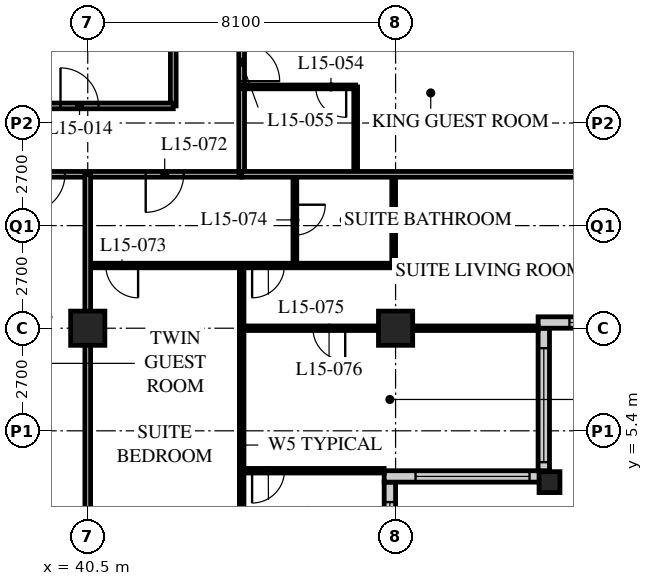
"""IFC4 building model, lengths in metres.
Left out: names, types, materials, properties, quantities, classifications, styles, units other than length and angle.
Written with IfcOpenShell. Run it as: python <this file> out.ifc"""

import sys

from ifc_helpers import new_model, si_unit, direction, frame, frame_2d, origin, origin_2d, place, context, subcontext, project, spatial, rectangle, hollow_rectangle, extrude, element, fill, save


model = new_model("IFC4")
c1 = context("Model", 3, precision=1e-05, world=origin(), true_north=direction((0.0, 1.0)))
c2 = subcontext(c1, "Body", "Model", "MODEL_VIEW")
j1 = project(units=[si_unit("LENGTHUNIT", "METRE"), si_unit("PLANEANGLEUNIT", "RADIAN")], contexts=[c1])
p1 = place(None, origin())
s1 = spatial("IfcSite", under=j1, at=p1, CompositionType="ELEMENT")
p2 = place(p1, origin())
s2 = spatial("IfcBuilding", under=s1, at=p2, CompositionType="ELEMENT")
p3 = place(p2, frame((0.0, 0.0, 63.6)))
s3 = spatial("IfcBuildingStorey", under=s2, at=p3, CompositionType="ELEMENT", Elevation=63.6)
for number, where, z_axis, x_axis in (
    (1, (40.5, 8.1, 0.0), (0.0, 0.0, 1.0), (1.0, 0.0, 0.0)),
    (2, (48.6, 8.1, 0.0), (0.0, 0.0, 1.0), (1.0, 0.0, 0.0)),
):
    element("IfcColumn", number, at=place(p3, frame(where, z_axis=z_axis, x_axis=x_axis)), inside=s3, PredefinedType="COLUMN", context=c2, shape_type="SweptSolid", body=[
        extrude(hollow_rectangle(XDim=0.9, YDim=0.9, WallThickness=0.09, at=origin_2d()), origin(), (0.0, 0.0, 1.0), 3.4),
    ])
p4 = place(p3, frame((52.65, 4.05, 0.0), z_axis=(0.0, 0.0, 1.0), x_axis=(1.0, 0.0, 0.0)))
e3 = element("IfcColumn", 3, at=p4, inside=s3, PredefinedType="COLUMN", context=c2, shape_type="SweptSolid", body=[
    extrude(hollow_rectangle(XDim=0.55, YDim=0.55, WallThickness=0.05, at=origin_2d()), origin(), (0.0, 0.0, 1.0), 3.4),
])
p5 = place(p3, frame((48.45, 0.3, 0.0), z_axis=(0.0, 0.0, 1.0), x_axis=(0.0, 1.0, 0.0)))
e4 = element("IfcWall", 4, at=p5, inside=s3, PredefinedType="SOLIDWALL", context=c2, shape_type="SweptSolid", body=[
    extrude(rectangle(XDim=3.75, YDim=0.3, at=frame_2d((1.875, 0.0))), origin(), (0.0, 0.0, 1.0), 3.19),
])
p6 = place(p5, frame((0.225, 0.0, 0.9)))
e5 = element("IfcOpeningElement", 5, at=p6, cuts=e4, PredefinedType="OPENING", context=c2, shape_type="SweptSolid", body=[
    extrude(rectangle(XDim=3.0, YDim=1.5, at=frame_2d((1.5, 0.75))), frame((0.0, 0.16, 0.0), z_axis=(0.0, -1.0, 0.0), x_axis=(1.0, 0.0, 0.0)), (0.0, 0.0, 1.0), 0.32),
])
p7 = place(p3, frame((48.3, 4.2, 0.0), z_axis=(0.0, 0.0, 1.0), x_axis=(1.0, 0.0, 0.0)))
e6 = element("IfcWall", 6, at=p7, inside=s3, PredefinedType="SOLIDWALL", context=c2, shape_type="SweptSolid", body=[
    extrude(rectangle(XDim=4.35, YDim=0.3, at=frame_2d((2.175, 0.0))), origin(), (0.0, 0.0, 1.0), 3.19),
])
p8 = place(p7, frame((0.825, 0.0, 0.9)))
e7 = element("IfcOpeningElement", 7, at=p8, cuts=e6, PredefinedType="OPENING", context=c2, shape_type="SweptSolid", body=[
    extrude(rectangle(XDim=3.0, YDim=1.5, at=frame_2d((1.5, 0.75))), frame((0.0, 0.16, 0.0), z_axis=(0.0, -1.0, 0.0), x_axis=(1.0, 0.0, 0.0)), (0.0, 0.0, 1.0), 0.32),
])
p9 = place(p3, frame((52.5, 4.35, 0.0), z_axis=(0.0, 0.0, 1.0), x_axis=(0.0, 1.0, 0.0)))
e8 = element("IfcWall", 8, at=p9, inside=s3, PredefinedType="SOLIDWALL", context=c2, shape_type="SweptSolid", body=[
    extrude(rectangle(XDim=3.75, YDim=0.3, at=frame_2d((1.875, 0.0))), origin(), (0.0, 0.0, 1.0), 3.19),
])
p10 = place(p9, frame((0.225, 0.0, 0.9)))
e9 = element("IfcOpeningElement", 9, at=p10, cuts=e8, PredefinedType="OPENING", context=c2, shape_type="SweptSolid", body=[
    extrude(rectangle(XDim=3.0, YDim=1.5, at=frame_2d((1.5, 0.75))), frame((0.0, 0.16, 0.0), z_axis=(0.0, -1.0, 0.0), x_axis=(1.0, 0.0, 0.0)), (0.0, 0.0, 1.0), 0.32),
])
p11 = place(p3, frame((52.35, 8.25, 0.0), z_axis=(0.0, 0.0, 1.0), x_axis=(1.0, 0.0, 0.0)))
e10 = element("IfcWall", 10, at=p11, inside=s3, PredefinedType="SOLIDWALL", context=c2, shape_type="SweptSolid", body=[
    extrude(rectangle(XDim=4.35, YDim=0.3, at=frame_2d((2.175, 0.0))), origin(), (0.0, 0.0, 1.0), 3.19),
])
p12 = place(p11, frame((0.825, 0.0, 0.9)))
e11 = element("IfcOpeningElement", 11, at=p12, cuts=e10, PredefinedType="OPENING", context=c2, shape_type="SweptSolid", body=[
    extrude(rectangle(XDim=3.0, YDim=1.5, at=frame_2d((1.5, 0.75))), frame((0.0, 0.16, 0.0), z_axis=(0.0, -1.0, 0.0), x_axis=(1.0, 0.0, 0.0)), (0.0, 0.0, 1.0), 0.32),
])
p13 = place(p3, frame((8.1, 12.15, 0.0), z_axis=(0.0, 0.0, 1.0), x_axis=(1.0, 0.0, 0.0)))
e12 = element("IfcWall", 12, at=p13, inside=s3, PredefinedType="PARTITIONING", context=c2, shape_type="SweptSolid", body=[
    extrude(rectangle(XDim=36.45, YDim=0.15, at=frame_2d((18.225, 0.0))), origin(), (0.0, 0.0, 1.0), 3.19),
])
p14 = place(p13, frame((4.35, 0.0, 0.0)))
e13 = element("IfcOpeningElement", 13, at=p14, cuts=e12, PredefinedType="OPENING", context=c2, shape_type="SweptSolid", body=[
    extrude(rectangle(XDim=1.0, YDim=2.1, at=frame_2d((0.5, 1.05))), frame((0.0, 0.085, 0.0), z_axis=(0.0, -1.0, 0.0), x_axis=(1.0, 0.0, 0.0)), (0.0, 0.0, 1.0), 0.17),
])
p15 = place(p13, frame((10.55, 0.0, 0.0)))
e14 = element("IfcOpeningElement", 14, at=p15, cuts=e12, PredefinedType="OPENING", context=c2, shape_type="SweptSolid", body=[
    extrude(rectangle(XDim=1.0, YDim=2.1, at=frame_2d((0.5, 1.05))), frame((0.0, 0.085, 0.0), z_axis=(0.0, -1.0, 0.0), x_axis=(1.0, 0.0, 0.0)), (0.0, 0.0, 1.0), 0.17),
])
p16 = place(p13, frame((14.6, 0.0, 0.0)))
e15 = element("IfcOpeningElement", 15, at=p16, cuts=e12, PredefinedType="OPENING", context=c2, shape_type="SweptSolid", body=[
    extrude(rectangle(XDim=1.0, YDim=2.1, at=frame_2d((0.5, 1.05))), frame((0.0, 0.085, 0.0), z_axis=(0.0, -1.0, 0.0), x_axis=(1.0, 0.0, 0.0)), (0.0, 0.0, 1.0), 0.17),
])
p17 = place(p13, frame((18.65, 0.0, 0.0)))
e16 = element("IfcOpeningElement", 16, at=p17, cuts=e12, PredefinedType="OPENING", context=c2, shape_type="SweptSolid", body=[
    extrude(rectangle(XDim=1.0, YDim=2.1, at=frame_2d((0.5, 1.05))), frame((0.0, 0.085, 0.0), z_axis=(0.0, -1.0, 0.0), x_axis=(1.0, 0.0, 0.0)), (0.0, 0.0, 1.0), 0.17),
])
p18 = place(p13, frame((22.7, 0.0, 0.0)))
e17 = element("IfcOpeningElement", 17, at=p18, cuts=e12, PredefinedType="OPENING", context=c2, shape_type="SweptSolid", body=[
    extrude(rectangle(XDim=1.0, YDim=2.1, at=frame_2d((0.5, 1.05))), frame((0.0, 0.085, 0.0), z_axis=(0.0, -1.0, 0.0), x_axis=(1.0, 0.0, 0.0)), (0.0, 0.0, 1.0), 0.17),
])
p19 = place(p13, frame((24.6, 0.0, 0.0)))
e18 = element("IfcOpeningElement", 18, at=p19, cuts=e12, PredefinedType="OPENING", context=c2, shape_type="SweptSolid", body=[
    extrude(rectangle(XDim=1.0, YDim=2.1, at=frame_2d((0.5, 1.05))), frame((0.0, 0.085, 0.0), z_axis=(0.0, -1.0, 0.0), x_axis=(1.0, 0.0, 0.0)), (0.0, 0.0, 1.0), 0.17),
])
p20 = place(p13, frame((30.8, 0.0, 0.0)))
e19 = element("IfcOpeningElement", 19, at=p20, cuts=e12, PredefinedType="OPENING", context=c2, shape_type="SweptSolid", body=[
    extrude(rectangle(XDim=1.0, YDim=2.1, at=frame_2d((0.5, 1.05))), frame((0.0, 0.085, 0.0), z_axis=(0.0, -1.0, 0.0), x_axis=(1.0, 0.0, 0.0)), (0.0, 0.0, 1.0), 0.17),
])
p21 = place(p13, frame((1.525, 0.0, 0.0)))
e20 = element("IfcOpeningElement", 20, at=p21, cuts=e12, PredefinedType="OPENING", context=c2, shape_type="SweptSolid", body=[
    extrude(rectangle(XDim=1.0, YDim=2.1, at=frame_2d((0.5, 1.05))), frame((0.0, 0.085, 0.0), z_axis=(0.0, -1.0, 0.0), x_axis=(1.0, 0.0, 0.0)), (0.0, 0.0, 1.0), 0.17),
])
p22 = place(p13, frame((33.925, 0.0, 0.0)))
e21 = element("IfcOpeningElement", 21, at=p22, cuts=e12, PredefinedType="OPENING", context=c2, shape_type="SweptSolid", body=[
    extrude(rectangle(XDim=1.0, YDim=2.1, at=frame_2d((0.5, 1.05))), frame((0.0, 0.085, 0.0), z_axis=(0.0, -1.0, 0.0), x_axis=(1.0, 0.0, 0.0)), (0.0, 0.0, 1.0), 0.17),
])
p23 = place(p3, frame((44.55, 12.15, 0.0), z_axis=(0.0, 0.0, 1.0), x_axis=(0.0, 1.0, 0.0)))
e22 = element("IfcWall", 22, at=p23, inside=s3, PredefinedType="PARTITIONING", context=c2, shape_type="SweptSolid", body=[
    extrude(rectangle(XDim=30.15, YDim=0.15, at=frame_2d((15.075, 0.0))), origin(), (0.0, 0.0, 1.0), 3.19),
])
p24 = place(p23, frame((2.45, 0.0, 0.0)))
e23 = element("IfcOpeningElement", 23, at=p24, cuts=e22, PredefinedType="OPENING", context=c2, shape_type="SweptSolid", body=[
    extrude(rectangle(XDim=1.0, YDim=2.1, at=frame_2d((0.5, 1.05))), frame((0.0, 0.085, 0.0), z_axis=(0.0, -1.0, 0.0), x_axis=(1.0, 0.0, 0.0)), (0.0, 0.0, 1.0), 0.17),
])
p25 = place(p23, frame((4.35, 0.0, 0.0)))
e24 = element("IfcOpeningElement", 24, at=p25, cuts=e22, PredefinedType="OPENING", context=c2, shape_type="SweptSolid", body=[
    extrude(rectangle(XDim=1.0, YDim=2.1, at=frame_2d((0.5, 1.05))), frame((0.0, 0.085, 0.0), z_axis=(0.0, -1.0, 0.0), x_axis=(1.0, 0.0, 0.0)), (0.0, 0.0, 1.0), 0.17),
])
p26 = place(p23, frame((8.4, 0.0, 0.0)))
e25 = element("IfcOpeningElement", 25, at=p26, cuts=e22, PredefinedType="OPENING", context=c2, shape_type="SweptSolid", body=[
    extrude(rectangle(XDim=1.0, YDim=2.1, at=frame_2d((0.5, 1.05))), frame((0.0, 0.085, 0.0), z_axis=(0.0, -1.0, 0.0), x_axis=(1.0, 0.0, 0.0)), (0.0, 0.0, 1.0), 0.17),
])
p27 = place(p23, frame((14.6, 0.0, 0.0)))
e26 = element("IfcOpeningElement", 26, at=p27, cuts=e22, PredefinedType="OPENING", context=c2, shape_type="SweptSolid", body=[
    extrude(rectangle(XDim=1.0, YDim=2.1, at=frame_2d((0.5, 1.05))), frame((0.0, 0.085, 0.0), z_axis=(0.0, -1.0, 0.0), x_axis=(1.0, 0.0, 0.0)), (0.0, 0.0, 1.0), 0.17),
])
p28 = place(p23, frame((21.65, 0.0, 0.0)))
e27 = element("IfcOpeningElement", 27, at=p28, cuts=e22, PredefinedType="OPENING", context=c2, shape_type="SweptSolid", body=[
    extrude(rectangle(XDim=1.0, YDim=2.1, at=frame_2d((0.5, 1.05))), frame((0.0, 0.085, 0.0), z_axis=(0.0, -1.0, 0.0), x_axis=(1.0, 0.0, 0.0)), (0.0, 0.0, 1.0), 0.17),
])
p29 = place(p23, frame((26.7, 0.0, 0.0)))
e28 = element("IfcOpeningElement", 28, at=p29, cuts=e22, PredefinedType="OPENING", context=c2, shape_type="SweptSolid", body=[
    extrude(rectangle(XDim=1.0, YDim=2.1, at=frame_2d((0.5, 1.05))), frame((0.0, 0.085, 0.0), z_axis=(0.0, -1.0, 0.0), x_axis=(1.0, 0.0, 0.0)), (0.0, 0.0, 1.0), 0.17),
])
p30 = place(p3, frame((42.75, 13.95, 0.0), z_axis=(0.0, 0.0, 1.0), x_axis=(0.0, 1.0, 0.0)))
e29 = element("IfcWall", 29, at=p30, inside=s3, PredefinedType="PARTITIONING", context=c2, shape_type="SweptSolid", body=[
    extrude(rectangle(XDim=26.55, YDim=0.15, at=frame_2d((13.275, 0.0))), origin(), (0.0, 0.0, 1.0), 3.19),
])
p31 = place(p30, frame((13.9, 0.0, 0.0)))
e30 = element("IfcOpeningElement", 30, at=p31, cuts=e29, PredefinedType="OPENING", context=c2, shape_type="SweptSolid", body=[
    extrude(rectangle(XDim=1.0, YDim=2.1, at=frame_2d((0.5, 1.05))), frame((0.0, 0.085, 0.0), z_axis=(0.0, -1.0, 0.0), x_axis=(1.0, 0.0, 0.0)), (0.0, 0.0, 1.0), 0.17),
])
p32 = place(p30, frame((22.0, 0.0, 0.0)))
e31 = element("IfcOpeningElement", 31, at=p32, cuts=e29, PredefinedType="OPENING", context=c2, shape_type="SweptSolid", body=[
    extrude(rectangle(XDim=1.0, YDim=2.1, at=frame_2d((0.5, 1.05))), frame((0.0, 0.085, 0.0), z_axis=(0.0, -1.0, 0.0), x_axis=(1.0, 0.0, 0.0)), (0.0, 0.0, 1.0), 0.17),
])
p33 = place(p3, frame((29.56, 13.95, 0.0), z_axis=(0.0, 0.0, 1.0), x_axis=(1.0, 0.0, 0.0)))
e32 = element("IfcWall", 32, at=p33, inside=s3, PredefinedType="PARTITIONING", context=c2, shape_type="SweptSolid", body=[
    extrude(rectangle(XDim=13.19, YDim=0.15, at=frame_2d((6.595, 0.0))), origin(), (0.0, 0.0, 1.0), 3.19),
])
p34 = place(p33, frame((1.157, 0.0, 0.0)))
e33 = element("IfcOpeningElement", 33, at=p34, cuts=e32, PredefinedType="OPENING", context=c2, shape_type="SweptSolid", body=[
    extrude(rectangle(XDim=1.0, YDim=2.1, at=frame_2d((0.5, 1.05))), frame((0.0, 0.085, 0.0), z_axis=(0.0, -1.0, 0.0), x_axis=(1.0, 0.0, 0.0)), (0.0, 0.0, 1.0), 0.17),
])
p35 = place(p33, frame((5.29, 0.0, 0.0)))
e34 = element("IfcOpeningElement", 34, at=p35, cuts=e32, PredefinedType="OPENING", context=c2, shape_type="SweptSolid", body=[
    extrude(rectangle(XDim=1.0, YDim=2.1, at=frame_2d((0.5, 1.05))), frame((0.0, 0.085, 0.0), z_axis=(0.0, -1.0, 0.0), x_axis=(1.0, 0.0, 0.0)), (0.0, 0.0, 1.0), 0.17),
])
p36 = place(p33, frame((10.223, 0.0, 0.0)))
e35 = element("IfcOpeningElement", 35, at=p36, cuts=e32, PredefinedType="OPENING", context=c2, shape_type="SweptSolid", body=[
    extrude(rectangle(XDim=1.0, YDim=2.1, at=frame_2d((0.5, 1.05))), frame((0.0, 0.085, 0.0), z_axis=(0.0, -1.0, 0.0), x_axis=(1.0, 0.0, 0.0)), (0.0, 0.0, 1.0), 0.17),
])
p37 = place(p3, frame((47.55, 12.15, 0.0), z_axis=(0.0, 0.0, 1.0), x_axis=(0.0, 1.0, 0.0)))
e36 = element("IfcWall", 36, at=p37, inside=s3, PredefinedType="PARTITIONING", context=c2, shape_type="SweptSolid", body=[
    extrude(rectangle(XDim=2.3, YDim=0.1, at=frame_2d((1.15, 0.0))), origin(), (0.0, 0.0, 1.0), 3.19),
])
p38 = place(p3, frame((44.55, 14.45, 0.0), z_axis=(0.0, 0.0, 1.0), x_axis=(1.0, 0.0, 0.0)))
e37 = element("IfcWall", 37, at=p38, inside=s3, PredefinedType="PARTITIONING", context=c2, shape_type="SweptSolid", body=[
    extrude(rectangle(XDim=3.0, YDim=0.1, at=frame_2d((1.5, 0.0))), origin(), (0.0, 0.0, 1.0), 3.19),
])
p39 = place(p38, frame((1.95, 0.0, 0.0)))
e38 = element("IfcOpeningElement", 38, at=p39, cuts=e37, PredefinedType="OPENING", context=c2, shape_type="SweptSolid", body=[
    extrude(rectangle(XDim=0.8, YDim=2.1, at=frame_2d((0.4, 1.05))), frame((0.0, 0.06, 0.0), z_axis=(0.0, -1.0, 0.0), x_axis=(1.0, 0.0, 0.0)), (0.0, 0.0, 1.0), 0.12),
])
p40 = place(p3, frame((40.5, 9.75, 0.0), z_axis=(0.0, 0.0, 1.0), x_axis=(1.0, 0.0, 0.0)))
e39 = element("IfcWall", 39, at=p40, inside=s3, PredefinedType="PARTITIONING", context=c2, shape_type="SweptSolid", body=[
    extrude(rectangle(XDim=8.05, YDim=0.12, at=frame_2d((4.025, 0.0))), origin(), (0.0, 0.0, 1.0), 3.19),
])
p41 = place(p40, frame((0.475, 0.0, 0.0)))
e40 = element("IfcOpeningElement", 40, at=p41, cuts=e39, PredefinedType="OPENING", context=c2, shape_type="SweptSolid", body=[
    extrude(rectangle(XDim=0.85, YDim=2.1, at=frame_2d((0.425, 1.05))), frame((0.0, 0.07, 0.0), z_axis=(0.0, -1.0, 0.0), x_axis=(1.0, 0.0, 0.0)), (0.0, 0.0, 1.0), 0.14),
])
p42 = place(p40, frame((4.325, 0.0, 0.0)))
e41 = element("IfcOpeningElement", 41, at=p42, cuts=e39, PredefinedType="OPENING", context=c2, shape_type="SweptSolid", body=[
    extrude(rectangle(XDim=0.85, YDim=2.1, at=frame_2d((0.425, 1.05))), frame((0.0, 0.07, 0.0), z_axis=(0.0, -1.0, 0.0), x_axis=(1.0, 0.0, 0.0)), (0.0, 0.0, 1.0), 0.14),
])
p43 = place(p3, frame((45.95, 12.15, 0.0), z_axis=(0.0, 0.0, 1.0), x_axis=(0.0, -1.0, 0.0)))
e42 = element("IfcWall", 42, at=p43, inside=s3, PredefinedType="PARTITIONING", context=c2, shape_type="SweptSolid", body=[
    extrude(rectangle(XDim=2.4, YDim=0.1, at=frame_2d((1.2, 0.0))), origin(), (0.0, 0.0, 1.0), 3.19),
])
p44 = place(p43, frame((0.8, 0.0, 0.0)))
e43 = element("IfcOpeningElement", 43, at=p44, cuts=e42, PredefinedType="OPENING", context=c2, shape_type="SweptSolid", body=[
    extrude(rectangle(XDim=0.8, YDim=2.1, at=frame_2d((0.4, 1.05))), frame((0.0, 0.06, 0.0), z_axis=(0.0, -1.0, 0.0), x_axis=(1.0, 0.0, 0.0)), (0.0, 0.0, 1.0), 0.12),
])
p45 = place(p3, frame((48.55, 12.15, 0.0), z_axis=(0.0, 0.0, 1.0), x_axis=(0.0, -1.0, 0.0)))
e44 = element("IfcWall", 44, at=p45, inside=s3, PredefinedType="PARTITIONING", context=c2, shape_type="SweptSolid", body=[
    extrude(rectangle(XDim=2.4, YDim=0.1, at=frame_2d((1.2, 0.0))), origin(), (0.0, 0.0, 1.0), 2.578),
])
p46 = place(p3, frame((44.55, 9.75, 0.0), z_axis=(0.0, 0.0, 1.0), x_axis=(0.0, -1.0, 0.0)))
e45 = element("IfcWall", 45, at=p46, inside=s3, PredefinedType="PARTITIONING", context=c2, shape_type="SweptSolid", body=[
    extrude(rectangle(XDim=9.45, YDim=0.12, at=frame_2d((4.725, 0.0))), origin(), (0.0, 0.0, 1.0), 3.19),
])
p47 = place(p3, frame((44.55, 8.1, 0.0), z_axis=(0.0, 0.0, 1.0), x_axis=(1.0, 0.0, 0.0)))
e46 = element("IfcWall", 46, at=p47, inside=s3, PredefinedType="PARTITIONING", context=c2, shape_type="SweptSolid", body=[
    extrude(rectangle(XDim=7.8, YDim=0.12, at=frame_2d((3.9, 0.0))), origin(), (0.0, 0.0, 1.0), 2.578),
])
p48 = place(p47, frame((1.875, 0.0, 0.0)))
e47 = element("IfcOpeningElement", 47, at=p48, cuts=e46, PredefinedType="OPENING", context=c2, shape_type="SweptSolid", body=[
    extrude(rectangle(XDim=0.85, YDim=2.1, at=frame_2d((0.425, 1.05))), frame((0.0, 0.07, 0.0), z_axis=(0.0, -1.0, 0.0), x_axis=(1.0, 0.0, 0.0)), (0.0, 0.0, 1.0), 0.14),
])
p49 = place(p3, frame((44.55, 12.15, 0.0), z_axis=(0.0, 0.0, 1.0), x_axis=(1.0, 0.0, 0.0)))
e48 = element("IfcWall", 48, at=p49, inside=s3, PredefinedType="PARTITIONING", context=c2, shape_type="SweptSolid", body=[
    extrude(rectangle(XDim=11.85, YDim=0.15, at=frame_2d((5.925, 0.0))), origin(), (0.0, 0.0, 1.0), 3.19),
])
p50 = place(p3, frame((40.5, 12.15, 0.0), z_axis=(0.0, 0.0, 1.0), x_axis=(0.0, -1.0, 0.0)))
e49 = element("IfcWall", 49, at=p50, inside=s3, PredefinedType="PARTITIONING", context=c2, shape_type="SweptSolid", body=[
    extrude(rectangle(XDim=11.85, YDim=0.15, at=frame_2d((5.925, 0.0))), origin(), (0.0, 0.0, 1.0), 2.578),
])
p51 = place(p3, frame((44.55, 4.35, 0.0), z_axis=(0.0, 0.0, 1.0), x_axis=(1.0, 0.0, 0.0)))
e50 = element("IfcWall", 50, at=p51, inside=s3, PredefinedType="PARTITIONING", context=c2, shape_type="SweptSolid", body=[
    extrude(rectangle(XDim=3.75, YDim=0.12, at=frame_2d((1.875, 0.0))), origin(), (0.0, 0.0, 1.0), 3.19),
])
p52 = place(p51, frame((0.275, 0.0, 0.0)))
e51 = element("IfcOpeningElement", 51, at=p52, cuts=e50, PredefinedType="OPENING", context=c2, shape_type="SweptSolid", body=[
    extrude(rectangle(XDim=0.85, YDim=2.1, at=frame_2d((0.425, 1.05))), frame((0.0, 0.07, 0.0), z_axis=(0.0, -1.0, 0.0), x_axis=(1.0, 0.0, 0.0)), (0.0, 0.0, 1.0), 0.14),
])
p53 = place(p6, origin())
e52 = element("IfcWindow", 52, at=p53, inside=s3, PartitioningType="SINGLE_PANEL", PredefinedType="WINDOW", context=c2, shape_type="SweptSolid", body=[
    extrude(rectangle(XDim=3.0, YDim=1.5, at=frame_2d((1.5, 0.75))), frame((0.0, 0.03, 0.0), z_axis=(0.0, -1.0, 0.0), x_axis=(1.0, 0.0, 0.0)), (0.0, 0.0, 1.0), 0.06),
])
fill(e5, e52)
p54 = place(p8, origin())
e53 = element("IfcWindow", 53, at=p54, inside=s3, PartitioningType="SINGLE_PANEL", PredefinedType="WINDOW", context=c2, shape_type="SweptSolid", body=[
    extrude(rectangle(XDim=3.0, YDim=1.5, at=frame_2d((1.5, 0.75))), frame((0.0, 0.03, 0.0), z_axis=(0.0, -1.0, 0.0), x_axis=(1.0, 0.0, 0.0)), (0.0, 0.0, 1.0), 0.06),
])
fill(e7, e53)
p55 = place(p10, origin())
e54 = element("IfcWindow", 54, at=p55, inside=s3, PartitioningType="SINGLE_PANEL", PredefinedType="WINDOW", context=c2, shape_type="SweptSolid", body=[
    extrude(rectangle(XDim=3.0, YDim=1.5, at=frame_2d((1.5, 0.75))), frame((0.0, 0.03, 0.0), z_axis=(0.0, -1.0, 0.0), x_axis=(1.0, 0.0, 0.0)), (0.0, 0.0, 1.0), 0.06),
])
fill(e9, e54)
p56 = place(p12, origin())
e55 = element("IfcWindow", 55, at=p56, inside=s3, PartitioningType="SINGLE_PANEL", PredefinedType="WINDOW", context=c2, shape_type="SweptSolid", body=[
    extrude(rectangle(XDim=3.0, YDim=1.5, at=frame_2d((1.5, 0.75))), frame((0.0, 0.03, 0.0), z_axis=(0.0, -1.0, 0.0), x_axis=(1.0, 0.0, 0.0)), (0.0, 0.0, 1.0), 0.06),
])
fill(e11, e55)
p57 = place(p36, origin())
e56 = element("IfcDoor", 56, at=p57, inside=s3, OperationType="SINGLE_SWING_LEFT", PredefinedType="DOOR", context=c2, shape_type="SweptSolid", body=[
    extrude(rectangle(XDim=1.0, YDim=2.1, at=frame_2d((0.5, 1.05))), frame((0.0, 0.025, 0.0), z_axis=(0.0, -1.0, 0.0), x_axis=(1.0, 0.0, 0.0)), (0.0, 0.0, 1.0), 0.05),
])
fill(e35, e56)
p58 = place(p20, origin())
e57 = element("IfcDoor", 57, at=p58, inside=s3, OperationType="SINGLE_SWING_RIGHT", PredefinedType="DOOR", context=c2, shape_type="SweptSolid", body=[
    extrude(rectangle(XDim=1.0, YDim=2.1, at=frame_2d((0.5, 1.05))), frame((0.0, 0.025, 0.0), z_axis=(0.0, -1.0, 0.0), x_axis=(1.0, 0.0, 0.0)), (0.0, 0.0, 1.0), 0.05),
])
fill(e19, e57)
p59 = place(p39, origin())
e58 = element("IfcDoor", 58, at=p59, inside=s3, OperationType="SINGLE_SWING_LEFT", PredefinedType="DOOR", context=c2, shape_type="SweptSolid", body=[
    extrude(rectangle(XDim=0.8, YDim=2.1, at=frame_2d((0.4, 1.05))), frame((0.0, 0.025, 0.0), z_axis=(0.0, -1.0, 0.0), x_axis=(1.0, 0.0, 0.0)), (0.0, 0.0, 1.0), 0.05),
])
fill(e38, e58)
p60 = place(p24, origin())
e59 = element("IfcDoor", 59, at=p60, inside=s3, OperationType="SINGLE_SWING_RIGHT", PredefinedType="DOOR", context=c2, shape_type="SweptSolid", body=[
    extrude(rectangle(XDim=1.0, YDim=2.1, at=frame_2d((0.5, 1.05))), frame((0.0, 0.025, 0.0), z_axis=(0.0, -1.0, 0.0), x_axis=(1.0, 0.0, 0.0)), (0.0, 0.0, 1.0), 0.05),
])
fill(e23, e59)
p61 = place(p22, origin())
e60 = element("IfcDoor", 60, at=p61, inside=s3, OperationType="SINGLE_SWING_RIGHT", PredefinedType="DOOR", context=c2, shape_type="SweptSolid", body=[
    extrude(rectangle(XDim=1.0, YDim=2.1, at=frame_2d((0.5, 1.05))), frame((0.0, 0.025, 0.0), z_axis=(0.0, -1.0, 0.0), x_axis=(1.0, 0.0, 0.0)), (0.0, 0.0, 1.0), 0.05),
])
fill(e21, e60)
p62 = place(p41, origin())
e61 = element("IfcDoor", 61, at=p62, inside=s3, OperationType="SINGLE_SWING_LEFT", PredefinedType="DOOR", context=c2, shape_type="SweptSolid", body=[
    extrude(rectangle(XDim=0.85, YDim=2.1, at=frame_2d((0.425, 1.05))), frame((0.0, 0.025, 0.0), z_axis=(0.0, -1.0, 0.0), x_axis=(1.0, 0.0, 0.0)), (0.0, 0.0, 1.0), 0.05),
])
fill(e40, e61)
p63 = place(p44, origin())
e62 = element("IfcDoor", 62, at=p63, inside=s3, OperationType="SINGLE_SWING_LEFT", PredefinedType="DOOR", context=c2, shape_type="SweptSolid", body=[
    extrude(rectangle(XDim=0.8, YDim=2.1, at=frame_2d((0.4, 1.05))), frame((0.0, 0.025, 0.0), z_axis=(0.0, -1.0, 0.0), x_axis=(1.0, 0.0, 0.0)), (0.0, 0.0, 1.0), 0.05),
])
fill(e43, e62)
p64 = place(p42, origin())
e63 = element("IfcDoor", 63, at=p64, inside=s3, OperationType="SINGLE_SWING_RIGHT", PredefinedType="DOOR", context=c2, shape_type="SweptSolid", body=[
    extrude(rectangle(XDim=0.85, YDim=2.1, at=frame_2d((0.425, 1.05))), frame((0.0, 0.025, 0.0), z_axis=(0.0, -1.0, 0.0), x_axis=(1.0, 0.0, 0.0)), (0.0, 0.0, 1.0), 0.05),
])
fill(e41, e63)
p65 = place(p48, origin())
e64 = element("IfcDoor", 64, at=p65, inside=s3, OperationType="SINGLE_SWING_LEFT", PredefinedType="DOOR", context=c2, shape_type="SweptSolid", body=[
    extrude(rectangle(XDim=0.85, YDim=2.1, at=frame_2d((0.425, 1.05))), frame((0.0, 0.025, 0.0), z_axis=(0.0, -1.0, 0.0), x_axis=(1.0, 0.0, 0.0)), (0.0, 0.0, 1.0), 0.05),
])
fill(e47, e64)
p66 = place(p52, origin())
e65 = element("IfcDoor", 65, at=p66, inside=s3, OperationType="SINGLE_SWING_RIGHT", PredefinedType="DOOR", context=c2, shape_type="SweptSolid", body=[
    extrude(rectangle(XDim=0.85, YDim=2.1, at=frame_2d((0.425, 1.05))), frame((0.0, 0.025, 0.0), z_axis=(0.0, -1.0, 0.0), x_axis=(1.0, 0.0, 0.0)), (0.0, 0.0, 1.0), 0.05),
])
fill(e51, e65)
save(model, sys.argv[1])
